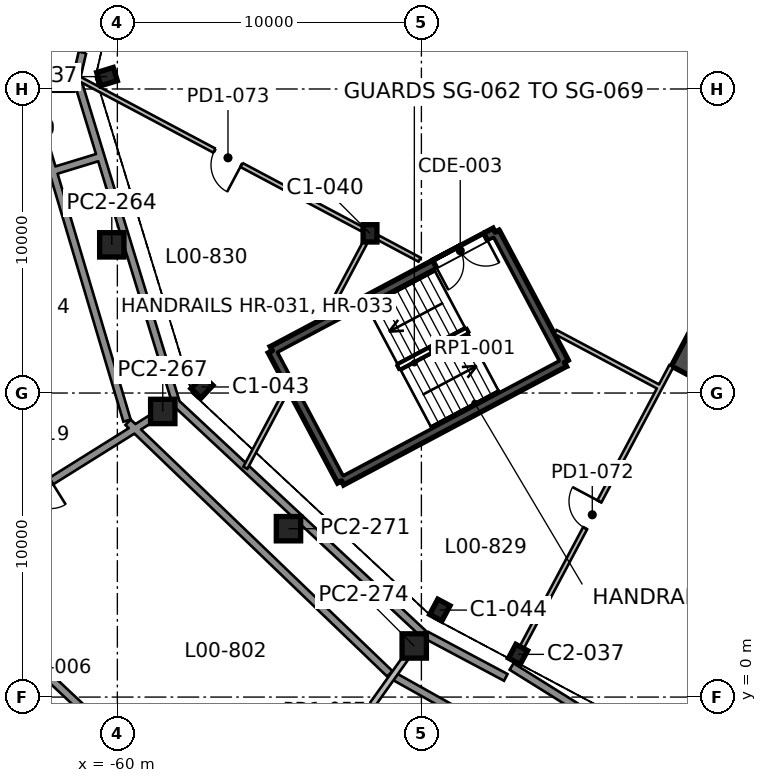
"""IFC4 building model, lengths in metres.
Left out: names, types, materials, properties, quantities, classifications, styles, units other than length and angle.
Written with IfcOpenShell. Run it as: python <this file> out.ifc"""

import sys

from ifc_helpers import new_model, si_unit, direction, frame, frame_2d, origin, origin_2d, place, context, subcontext, project, spatial, rectangle, i_section, extrude, element, fill, save


model = new_model("IFC4")
c1 = context("Model", 3, precision=1e-05, world=origin(), true_north=direction((0.0, 1.0)))
c2 = subcontext(c1, "Body", "Model", "MODEL_VIEW")
j1 = project(units=[si_unit("LENGTHUNIT", "METRE"), si_unit("PLANEANGLEUNIT", "RADIAN")], contexts=[c1])
p1 = place(None, origin())
s1 = spatial("IfcSite", under=j1, at=p1, CompositionType="ELEMENT")
p2 = place(p1, origin())
s2 = spatial("IfcBuilding", under=s1, at=p2, CompositionType="ELEMENT")
p3 = place(p2, origin())
s3 = spatial("IfcBuildingStorey", under=s2, at=p3, CompositionType="ELEMENT", Elevation=0.0)
p4 = place(p3, frame((-46.821, 1.405, 0.0), z_axis=(0.0, 0.0, 1.0), x_axis=(0.882947592859, -0.469471562786, 0.0)))
e1 = element("IfcColumn", 1, at=p4, inside=s3, PredefinedType="COLUMN", context=c2, shape_type="SweptSolid", body=[
    extrude(i_section(OverallWidth=0.437, OverallDepth=0.513, WebThickness=0.061, FlangeThickness=0.097, FilletRadius=0.015, at=origin_2d()), origin(), (0.0, 0.0, 1.0), 7.0),
])
for number, where, z_axis, x_axis in (
    (2, (-49.394, 2.861, 0.0), (0.0, 0.0, 1.0), (0.883, -0.469, 0.0)),
    (3, (-57.219, 10.199, 0.0), (0.0, 0.0, 1.0), (0.731, -0.682, 0.0)),
    (4, (-51.69, 15.252, 0.0), (0.0, 0.0, 1.0), (1.0, 0.0, 0.0)),
    (5, (-60.34, 20.407, 0.0), (0.0, 0.0, 1.0), (0.292, -0.956, 0.0)),
):
    element("IfcColumn", number, at=place(p3, frame(where, z_axis=z_axis, x_axis=x_axis)), inside=s3, PredefinedType="COLUMN", context=c2, shape_type="SweptSolid", body=[
        extrude(i_section(OverallWidth=0.455, OverallDepth=0.569, WebThickness=0.078, FlangeThickness=0.125, FilletRadius=0.015, at=origin_2d()), origin(), (0.0, 0.0, 1.0), 7.0),
    ])
p5 = place(p3, frame((-31.992, 28.336, 0.0), z_axis=(0.0, 0.0, 1.0), x_axis=(-0.46947084998, -0.882947971864, 0.0)))
e6 = element("IfcWall", 6, at=p5, inside=s3, PredefinedType="SHEAR", context=c2, shape_type="SweptSolid", body=[
    extrude(rectangle(XDim=20.0, YDim=0.9, at=frame_2d((10.0, 0.0))), origin(), (0.0, 0.0, 1.0), 7.0),
])
p6 = place(p5, frame((10.6, 0.0, 0.0)))
e7 = element("IfcOpeningElement", 7, at=p6, cuts=e6, PredefinedType="OPENING", context=c2, shape_type="SweptSolid", body=[
    extrude(rectangle(XDim=2.4, YDim=2.4, at=frame_2d((1.2, 1.2))), frame((0.0, 0.46, 0.0), z_axis=(0.0, -1.0, 0.0), x_axis=(1.0, 0.0, 0.0)), (0.0, 0.0, 1.0), 0.92),
])
p7 = place(p3, frame((-47.574, 15.29, 0.0), z_axis=(0.0, 0.0, 1.0), x_axis=(0.469443498566, -0.882962514297, 0.0)))
e8 = element("IfcWall", 8, at=p7, inside=s3, PredefinedType="SHEAR", context=c2, shape_type="SweptSolid", body=[
    extrude(rectangle(XDim=4.85, YDim=0.3, at=frame_2d((2.425, 0.0))), origin(), (0.0, 0.0, 1.0), 7.0),
])
p8 = place(p3, frame((-45.297, 11.007, 0.0), z_axis=(0.0, 0.0, 1.0), x_axis=(-0.882951519127, -0.469464178475, 0.0)))
e9 = element("IfcWall", 9, at=p8, inside=s3, PredefinedType="SHEAR", context=c2, shape_type="SweptSolid", body=[
    extrude(rectangle(XDim=8.3, YDim=0.3, at=frame_2d((4.15, 0.0))), origin(), (0.0, 0.0, 1.0), 7.0),
])
p9 = place(p3, frame((-52.626, 7.111, 0.0), z_axis=(0.0, 0.0, 1.0), x_axis=(-0.469464364128, 0.882951420416, 0.0)))
e10 = element("IfcWall", 10, at=p9, inside=s3, PredefinedType="SHEAR", context=c2, shape_type="SweptSolid", body=[
    extrude(rectangle(XDim=4.85, YDim=0.3, at=frame_2d((2.425, 0.0))), origin(), (0.0, 0.0, 1.0), 7.0),
])
p10 = place(p3, frame((-54.903, 11.393, 0.0), z_axis=(0.0, 0.0, 1.0), x_axis=(0.882939326045, 0.469487110071, 0.0)))
e11 = element("IfcWall", 11, at=p10, inside=s3, PredefinedType="SHEAR", context=c2, shape_type="SweptSolid", body=[
    extrude(rectangle(XDim=8.3, YDim=0.3, at=frame_2d((4.15, 0.0))), origin(), (0.0, 0.0, 1.0), 7.0),
])
p11 = place(p10, frame((6.05, 0.0, 0.0)))
e12 = element("IfcOpeningElement", 12, at=p11, cuts=e11, PredefinedType="OPENING", context=c2, shape_type="SweptSolid", body=[
    extrude(rectangle(XDim=1.9, YDim=2.1, at=frame_2d((0.95, 1.05))), frame((0.0, 0.16, 0.0), z_axis=(0.0, -1.0, 0.0), x_axis=(1.0, 0.0, 0.0)), (0.0, 0.0, 1.0), 0.32),
])
for number, where, z_axis, x_axis in (
    (13, (-50.236, 1.681, 0.0), (0.0, 0.0, 1.0), (1.0, 0.0, 0.0)),
    (14, (-54.372, 5.538, 0.0), (0.0, 0.0, 1.0), (1.0, 0.0, 0.0)),
    (15, (-58.507, 9.394, 0.0), (0.0, 0.0, 1.0), (1.0, 0.0, 0.0)),
    (16, (-60.183, 14.874, 0.0), (0.0, 0.0, 1.0), (1.0, 0.0, 0.0)),
    (17, (-61.858, 20.354, 0.0), (0.0, 0.0, 1.0), (1.0, 0.0, 0.0)),
):
    element("IfcColumn", number, at=place(p3, frame(where, z_axis=z_axis, x_axis=x_axis)), inside=s3, PredefinedType="COLUMN", context=c2, shape_type="SweptSolid", body=[
        extrude(rectangle(XDim=0.8, YDim=0.8, at=origin_2d()), origin(), (0.0, 0.0, 1.0), 6.37),
    ])
p12 = place(p3, frame((-67.902, 3.524, 0.0), z_axis=(0.0, 0.0, 1.0), x_axis=(0.731345713801, -0.682006925848, 0.0)))
e18 = element("IfcWall", 18, at=p12, inside=s3, PredefinedType="SOLIDWALL", context=c2, shape_type="SweptSolid", body=[
    extrude(rectangle(XDim=15.706, YDim=0.4, at=frame_2d((7.853, 0.0))), origin(), (0.0, 0.0, 1.0), 6.37),
])
p13 = place(p12, frame((1.357, 0.0, 0.0)))
e19 = element("IfcOpeningElement", 19, at=p13, cuts=e18, PredefinedType="OPENING", context=c2, shape_type="SweptSolid", body=[
    extrude(rectangle(XDim=2.4, YDim=2.4, at=frame_2d((1.2, 1.2))), frame((0.0, 0.21, 0.0), z_axis=(0.0, -1.0, 0.0), x_axis=(1.0, 0.0, 0.0)), (0.0, 0.0, 1.0), 0.42),
])
p14 = place(p12, frame((6.579, 0.0, 0.0)))
e20 = element("IfcOpeningElement", 20, at=p14, cuts=e18, PredefinedType="OPENING", context=c2, shape_type="SweptSolid", body=[
    extrude(rectangle(XDim=2.4, YDim=2.4, at=frame_2d((1.2, 1.2))), frame((0.0, 0.21, 0.0), z_axis=(0.0, -1.0, 0.0), x_axis=(1.0, 0.0, 0.0)), (0.0, 0.0, 1.0), 0.42),
])
p15 = place(p12, frame((11.801, 0.0, 0.0)))
e21 = element("IfcOpeningElement", 21, at=p15, cuts=e18, PredefinedType="OPENING", context=c2, shape_type="SweptSolid", body=[
    extrude(rectangle(XDim=2.4, YDim=2.4, at=frame_2d((1.2, 1.2))), frame((0.0, 0.21, 0.0), z_axis=(0.0, -1.0, 0.0), x_axis=(1.0, 0.0, 0.0)), (0.0, 0.0, 1.0), 0.42),
])
p16 = place(p3, frame((-55.543, -5.642, 7.0), z_axis=(0.0, 0.0, 1.0), x_axis=(-0.728908334125, 0.684611306102, 0.0)))
e22 = element("IfcWall", 22, at=p16, inside=s3, PredefinedType="STANDARD", context=c2, shape_type="SweptSolid", body=[
    extrude(rectangle(XDim=14.886, YDim=0.25, at=frame_2d((7.443, 0.0))), origin(), (0.0, 0.0, 1.0), 0.65),
])
p17 = place(p3, frame((-60.539, 31.513, 7.0), z_axis=(0.0, 0.0, 1.0), x_axis=(-0.220607009729, -0.975362777257, 0.0)))
e23 = element("IfcWall", 23, at=p17, inside=s3, PredefinedType="STANDARD", context=c2, shape_type="SweptSolid", body=[
    extrude(rectangle(XDim=11.344, YDim=0.25, at=frame_2d((5.672, 0.0))), origin(), (0.0, 0.0, 1.0), 0.65),
])
p18 = place(p3, frame((-63.039, 20.385, 7.0), z_axis=(0.0, 0.0, 1.0), x_axis=(0.284972326549, -0.9585357443, 0.0)))
e24 = element("IfcWall", 24, at=p18, inside=s3, PredefinedType="STANDARD", context=c2, shape_type="SweptSolid", body=[
    extrude(rectangle(XDim=11.781, YDim=0.25, at=frame_2d((5.89, 0.0))), origin(), (0.0, 0.0, 1.0), 0.65),
])
p19 = place(p3, frame((-59.649, 9.039, 7.0), z_axis=(0.0, 0.0, 1.0), x_axis=(0.721064848091, -0.692867581034, 0.0)))
e25 = element("IfcWall", 25, at=p19, inside=s3, PredefinedType="STANDARD", context=c2, shape_type="SweptSolid", body=[
    extrude(rectangle(XDim=11.94, YDim=0.25, at=frame_2d((5.97, 0.0))), origin(), (0.0, 0.0, 1.0), 0.65),
])
p20 = place(p3, frame((-51.014, 0.747, 7.0), z_axis=(0.0, 0.0, 1.0), x_axis=(0.872584878438, -0.488462516394, 0.0)))
e26 = element("IfcWall", 26, at=p20, inside=s3, PredefinedType="STANDARD", context=c2, shape_type="SweptSolid", body=[
    extrude(rectangle(XDim=6.809, YDim=0.25, at=frame_2d((3.405, 0.0))), origin(), (0.0, 0.0, 1.0), 0.65),
])
p21 = place(p3, frame((-61.338, 20.382, 0.0), z_axis=(0.0, 0.0, 1.0), x_axis=(0.224998426256, 0.974359126905, 0.0)))
e27 = element("IfcWall", 27, at=p21, inside=s3, PredefinedType="SOLIDWALL", context=c2, shape_type="SweptSolid", body=[
    extrude(rectangle(XDim=2.695, YDim=0.25, at=frame_2d((1.348, 0.0))), origin(), (0.0, 0.0, 1.0), 6.37),
])
p22 = place(p21, frame((0.848, 0.0, 0.0)))
e28 = element("IfcOpeningElement", 28, at=p22, cuts=e27, PredefinedType="OPENING", context=c2, shape_type="SweptSolid", body=[
    extrude(rectangle(XDim=1.0, YDim=2.1, at=frame_2d((0.5, 1.05))), frame((0.0, 0.135, 0.0), z_axis=(0.0, -1.0, 0.0), x_axis=(1.0, 0.0, 0.0)), (0.0, 0.0, 1.0), 0.27),
])
p23 = place(p3, frame((-71.067, 14.562, 0.0), z_axis=(0.0, 0.0, 1.0), x_axis=(0.956304866869, 0.292371341965, 0.0)))
e29 = element("IfcWall", 29, at=p23, inside=s3, PredefinedType="SOLIDWALL", context=c2, shape_type="SweptSolid", body=[
    extrude(rectangle(XDim=11.0, YDim=0.25, at=frame_2d((5.5, 0.0))), origin(), (0.0, 0.0, 1.0), 6.37),
])
p24 = place(p23, frame((5.0, 0.0, 0.0)))
e30 = element("IfcOpeningElement", 30, at=p24, cuts=e29, PredefinedType="OPENING", context=c2, shape_type="SweptSolid", body=[
    extrude(rectangle(XDim=1.0, YDim=2.1, at=frame_2d((0.5, 1.05))), frame((0.0, 0.135, 0.0), z_axis=(0.0, -1.0, 0.0), x_axis=(1.0, 0.0, 0.0)), (0.0, 0.0, 1.0), 0.27),
])
p25 = place(p3, frame((-60.549, 17.783, 0.0), z_axis=(0.0, 0.0, 1.0), x_axis=(-0.291634808329, 0.956529737421, 0.0)))
e31 = element("IfcWall", 31, at=p25, inside=s3, PredefinedType="SOLIDWALL", context=c2, shape_type="SweptSolid", body=[
    extrude(rectangle(XDim=2.71, YDim=0.25, at=frame_2d((1.355, 0.0))), origin(), (0.0, 0.0, 1.0), 6.37),
])
p26 = place(p3, frame((-58.065, 9.666, 0.0), z_axis=(0.0, 0.0, 1.0), x_axis=(-0.292613894095, 0.956230677704, 0.0)))
e32 = element("IfcWall", 32, at=p26, inside=s3, PredefinedType="SOLIDWALL", context=c2, shape_type="SweptSolid", body=[
    extrude(rectangle(XDim=8.487, YDim=0.25, at=frame_2d((4.244, 0.0))), origin(), (0.0, 0.0, 1.0), 6.37),
])
p27 = place(p3, frame((-66.975, 4.103, 0.0), z_axis=(0.0, 0.0, 1.0), x_axis=(0.848048758951, 0.529918203539, 0.0)))
e33 = element("IfcWall", 33, at=p27, inside=s3, PredefinedType="SOLIDWALL", context=c2, shape_type="SweptSolid", body=[
    extrude(rectangle(XDim=9.514, YDim=0.25, at=frame_2d((4.757, 0.0))), origin(), (0.0, 0.0, 1.0), 6.37),
])
p28 = place(p27, frame((3.857, 0.0, 0.0)))
e34 = element("IfcOpeningElement", 34, at=p28, cuts=e33, PredefinedType="OPENING", context=c2, shape_type="SweptSolid", body=[
    extrude(rectangle(XDim=1.8, YDim=2.1, at=frame_2d((0.9, 1.05))), frame((0.0, 0.135, 0.0), z_axis=(0.0, -1.0, 0.0), x_axis=(1.0, 0.0, 0.0)), (0.0, 0.0, 1.0), 0.27),
])
p29 = place(p3, frame((-47.224, 0.646, 0.0), z_axis=(0.0, 0.0, 1.0), x_axis=(-0.882766080441, 0.469812778905, 0.0)))
e35 = element("IfcWall", 35, at=p29, inside=s3, PredefinedType="SOLIDWALL", context=c2, shape_type="SweptSolid", body=[
    extrude(rectangle(XDim=2.958, YDim=0.25, at=frame_2d((1.479, 0.0))), origin(), (0.0, 0.0, 1.0), 6.37),
])
p30 = place(p3, frame((-42.037, -2.112, 0.0), z_axis=(0.0, 0.0, 1.0), x_axis=(-0.848449825707, 0.529275819642, 0.0)))
e36 = element("IfcWall", 36, at=p30, inside=s3, PredefinedType="SOLIDWALL", context=c2, shape_type="SweptSolid", body=[
    extrude(rectangle(XDim=5.889, YDim=0.25, at=frame_2d((2.945, 0.0))), origin(), (0.0, 0.0, 1.0), 6.37),
])
p31 = place(p3, frame((-50.521, 1.281, 0.0), z_axis=(0.0, 0.0, 1.0), x_axis=(-0.580708624763, -0.814111474631, 0.0)))
e37 = element("IfcWall", 37, at=p31, inside=s3, PredefinedType="PARTITIONING", context=c2, shape_type="SweptSolid", body=[
    extrude(rectangle(XDim=9.204, YDim=0.2, at=frame_2d((4.602, 0.0))), origin(), (0.0, 0.0, 1.0), 6.37),
])
p32 = place(p31, frame((4.102, 0.0, 0.0)))
e38 = element("IfcOpeningElement", 38, at=p32, cuts=e37, PredefinedType="OPENING", context=c2, shape_type="SweptSolid", body=[
    extrude(rectangle(XDim=1.0, YDim=2.1, at=frame_2d((0.5, 1.05))), frame((0.0, 0.11, 0.0), z_axis=(0.0, -1.0, 0.0), x_axis=(1.0, 0.0, 0.0)), (0.0, 0.0, 1.0), 0.22),
])
p33 = place(p3, frame((-51.427, 15.113, 0.0), z_axis=(0.0, 0.0, 1.0), x_axis=(0.882911356804, -0.469539706549, 0.0)))
e39 = element("IfcWall", 39, at=p33, inside=s3, PredefinedType="PARTITIONING", context=c2, shape_type="SweptSolid", body=[
    extrude(rectangle(XDim=1.547, YDim=0.15, at=frame_2d((0.774, 0.0))), origin(), (0.0, 0.0, 1.0), 6.55),
])
p34 = place(p3, frame((-45.589, 12.009, 0.0), z_axis=(0.0, 0.0, 1.0), x_axis=(0.882939358107, -0.469487049773, 0.0)))
e40 = element("IfcWall", 40, at=p34, inside=s3, PredefinedType="PARTITIONING", context=c2, shape_type="SweptSolid", body=[
    extrude(rectangle(XDim=3.891, YDim=0.15, at=frame_2d((1.945, 0.0))), origin(), (0.0, 0.0, 1.0), 6.55),
])
p35 = place(p3, frame((-61.338, 20.382, 0.0), z_axis=(0.0, 0.0, 1.0), x_axis=(0.882969363327, -0.4694306162, 0.0)))
e41 = element("IfcWall", 41, at=p35, inside=s3, PredefinedType="PARTITIONING", context=c2, shape_type="SweptSolid", body=[
    extrude(rectangle(XDim=0.799, YDim=0.15, at=frame_2d((0.4, 0.0))), origin(), (0.0, 0.0, 1.0), 6.55),
])
p36 = place(p3, frame((-60.632, 20.007, 0.0), z_axis=(0.0, 0.0, 1.0), x_axis=(0.882940733586, -0.469484462975, 0.0)))
e42 = element("IfcWall", 42, at=p36, inside=s3, PredefinedType="PARTITIONING", context=c2, shape_type="SweptSolid", body=[
    extrude(rectangle(XDim=9.83, YDim=0.15, at=frame_2d((4.915, 0.0))), origin(), (0.0, 0.0, 1.0), 6.55),
])
p37 = place(p36, frame((4.337, 0.0, 0.0)))
e43 = element("IfcOpeningElement", 43, at=p37, cuts=e42, PredefinedType="OPENING", context=c2, shape_type="SweptSolid", body=[
    extrude(rectangle(XDim=1.0, YDim=2.1, at=frame_2d((0.5, 1.05))), frame((0.0, 0.085, 0.0), z_axis=(0.0, -1.0, 0.0), x_axis=(1.0, 0.0, 0.0)), (0.0, 0.0, 1.0), 0.17),
])
p38 = place(p3, frame((-42.151, 10.187, 0.0), z_axis=(0.0, 0.0, 1.0), x_axis=(0.469582372655, 0.882888665287, 0.0)))
e44 = element("IfcWall", 44, at=p38, inside=s3, PredefinedType="PARTITIONING", context=c2, shape_type="SweptSolid", body=[
    extrude(rectangle(XDim=0.794, YDim=0.15, at=frame_2d((0.397, 0.0))), origin(), (0.0, 0.0, 1.0), 6.55),
])
p39 = place(p3, frame((-51.858, 14.936, 0.0), z_axis=(0.0, 0.0, 1.0), x_axis=(-0.469439381141, -0.882964703391, 0.0)))
e45 = element("IfcWall", 45, at=p39, inside=s3, PredefinedType="PARTITIONING", context=c2, shape_type="SweptSolid", body=[
    extrude(rectangle(XDim=2.659, YDim=0.15, at=frame_2d((1.33, 0.0))), origin(), (0.0, 0.0, 1.0), 6.55),
])
p40 = place(p3, frame((-54.431, 10.097, 0.0), z_axis=(0.0, 0.0, 1.0), x_axis=(-0.46949257756, -0.882936418784, 0.0)))
e46 = element("IfcWall", 46, at=p40, inside=s3, PredefinedType="PARTITIONING", context=c2, shape_type="SweptSolid", body=[
    extrude(rectangle(XDim=2.892, YDim=0.15, at=frame_2d((1.446, 0.0))), origin(), (0.0, 0.0, 1.0), 6.55),
])
p41 = place(p3, frame((-46.7, 1.632, 0.0), z_axis=(0.0, 0.0, 1.0), x_axis=(0.46948131983, 0.882942404878, 0.0)))
e47 = element("IfcWall", 47, at=p41, inside=s3, PredefinedType="PARTITIONING", context=c2, shape_type="SweptSolid", body=[
    extrude(rectangle(XDim=9.688, YDim=0.15, at=frame_2d((4.844, 0.0))), origin(), (0.0, 0.0, 1.0), 6.55),
])
p42 = place(p41, frame((4.443, 0.0, 0.0)))
e48 = element("IfcOpeningElement", 48, at=p42, cuts=e47, PredefinedType="OPENING", context=c2, shape_type="SweptSolid", body=[
    extrude(rectangle(XDim=1.0, YDim=2.1, at=frame_2d((0.5, 1.05))), frame((0.0, 0.085, 0.0), z_axis=(0.0, -1.0, 0.0), x_axis=(1.0, 0.0, 0.0)), (0.0, 0.0, 1.0), 0.17),
])
p43 = place(p3, frame((-55.785, 7.539, 0.0), z_axis=(0.0, 0.0, 1.0), x_axis=(0.731373339026, -0.681977300914, 0.0)))
e49 = element("IfcWall", 49, at=p43, inside=s3, PredefinedType="SOLIDWALL", context=c2, shape_type="SweptSolid", body=[
    extrude(rectangle(XDim=2.348, YDim=0.25, at=frame_2d((1.174, 0.0))), origin(), (0.0, 0.0, 1.0), 6.37),
])
p44 = place(p3, frame((-53.972, 5.849, 0.0), z_axis=(0.0, 0.0, 1.0), x_axis=(0.731317536597, -0.682037140239, 0.0)))
e50 = element("IfcWall", 50, at=p44, inside=s3, PredefinedType="SOLIDWALL", context=c2, shape_type="SweptSolid", body=[
    extrude(rectangle(XDim=5.509, YDim=0.25, at=frame_2d((2.754, 0.0))), origin(), (0.0, 0.0, 1.0), 6.37),
])
p45 = place(p3, frame((-58.068, 9.669, 0.0), z_axis=(0.0, 0.0, 1.0), x_axis=(0.731356961262, -0.681994864507, 0.0)))
e51 = element("IfcWall", 51, at=p45, inside=s3, PredefinedType="SOLIDWALL", context=c2, shape_type="SweptSolid", body=[
    extrude(rectangle(XDim=3.121, YDim=0.25, at=frame_2d((1.561, 0.0))), origin(), (0.0, 0.0, 1.0), 6.37),
])
p46 = place(p11, frame((1.9, 0.0, 0.0), z_axis=(0.0, 0.0, 1.0), x_axis=(-1.0, 0.0, 0.0)))
e52 = element("IfcDoor", 52, at=p46, inside=s3, OperationType="DOUBLE_DOOR_SINGLE_SWING", PredefinedType="DOOR", context=c2, shape_type="SweptSolid", body=[
    extrude(rectangle(XDim=1.9, YDim=2.1, at=frame_2d((0.95, 1.05))), frame((0.0, 0.025, 0.0), z_axis=(0.0, -1.0, 0.0), x_axis=(1.0, 0.0, 0.0)), (0.0, 0.0, 1.0), 0.05),
])
fill(e12, e52)
p47 = place(p37, frame((1.0, 0.0, 0.0), z_axis=(0.0, 0.0, 1.0), x_axis=(-1.0, 0.0, 0.0)))
e53 = element("IfcDoor", 53, at=p47, inside=s3, OperationType="SINGLE_SWING_LEFT", PredefinedType="DOOR", context=c2, shape_type="SweptSolid", body=[
    extrude(rectangle(XDim=1.0, YDim=2.1, at=frame_2d((0.5, 1.05))), frame((0.0, 0.025, 0.0), z_axis=(0.0, -1.0, 0.0), x_axis=(1.0, 0.0, 0.0)), (0.0, 0.0, 1.0), 0.05),
])
fill(e43, e53)
p48 = place(p42, origin())
e54 = element("IfcDoor", 54, at=p48, inside=s3, OperationType="SINGLE_SWING_RIGHT", PredefinedType="DOOR", context=c2, shape_type="SweptSolid", body=[
    extrude(rectangle(XDim=1.0, YDim=2.1, at=frame_2d((0.5, 1.05))), frame((0.0, 0.025, 0.0), z_axis=(0.0, -1.0, 0.0), x_axis=(1.0, 0.0, 0.0)), (0.0, 0.0, 1.0), 0.05),
])
fill(e48, e54)
save(model, sys.argv[1])
